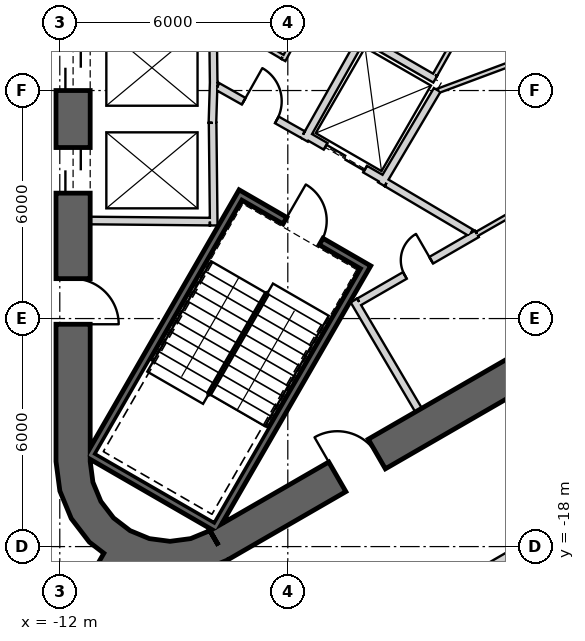
"""IFC4 building model, lengths in metres.
Left out: names, types, materials, properties, quantities, classifications, styles, units other than length and angle.
Written with IfcOpenShell. Run it as: python <this file> out.ifc"""

import sys

from ifc_helpers import new_model, si_unit, direction, frame, frame_2d, origin, place, context, subcontext, project, spatial, polyline, rectangle, outline, extrude, element, fill, save


model = new_model("IFC4")
c1 = context("Model", 3, precision=1e-05, world=origin(), true_north=direction((0.0, 1.0)))
c2 = subcontext(c1, "Body", "Model", "MODEL_VIEW")
j1 = project(units=[si_unit("LENGTHUNIT", "METRE"), si_unit("PLANEANGLEUNIT", "RADIAN")], contexts=[c1])
p1 = place(None, origin())
s1 = spatial("IfcSite", under=j1, at=p1, CompositionType="ELEMENT")
p2 = place(p1, origin())
s2 = spatial("IfcBuilding", under=s1, at=p2, CompositionType="ELEMENT")
p3 = place(p2, frame((0.0, 0.0, 298.7)))
s3 = spatial("IfcBuildingStorey", under=s2, at=p3, CompositionType="ELEMENT", Elevation=298.7)
p4 = place(p3, frame((-11.65, 15.762, 0.0), z_axis=(0.0, 0.0, 1.0), x_axis=(0.0, -1.0, 0.0)))
e1 = element("IfcWall", 1, at=p4, inside=s3, PredefinedType="SHEAR", context=c2, shape_type="SweptSolid", body=[
    extrude(rectangle(XDim=31.523, YDim=0.9, at=frame_2d((15.762, 0.0))), origin(), (0.0, 0.0, 1.0), 3.9),
])
p5 = place(p4, frame((7.062, 0.0, 0.0)))
e2 = element("IfcOpeningElement", 2, at=p5, cuts=e1, PredefinedType="OPENING", context=c2, shape_type="SweptSolid", body=[
    extrude(rectangle(XDim=1.2, YDim=2.4, at=frame_2d((0.6, 1.2))), frame((0.0, 0.46, 0.0), z_axis=(0.0, -1.0, 0.0), x_axis=(1.0, 0.0, 0.0)), (0.0, 0.0, 1.0), 0.92),
])
p6 = place(p4, frame((9.762, 0.0, 0.0)))
e3 = element("IfcOpeningElement", 3, at=p6, cuts=e1, PredefinedType="OPENING", context=c2, shape_type="SweptSolid", body=[
    extrude(rectangle(XDim=1.2, YDim=2.4, at=frame_2d((0.6, 1.2))), frame((0.0, 0.46, 0.0), z_axis=(0.0, -1.0, 0.0), x_axis=(1.0, 0.0, 0.0)), (0.0, 0.0, 1.0), 0.92),
])
p7 = place(p4, frame((12.462, 0.0, 0.0)))
e4 = element("IfcOpeningElement", 4, at=p7, cuts=e1, PredefinedType="OPENING", context=c2, shape_type="SweptSolid", body=[
    extrude(rectangle(XDim=1.2, YDim=2.4, at=frame_2d((0.6, 1.2))), frame((0.0, 0.46, 0.0), z_axis=(0.0, -1.0, 0.0), x_axis=(1.0, 0.0, 0.0)), (0.0, 0.0, 1.0), 0.92),
])
p8 = place(p4, frame((15.162, 0.0, 0.0)))
e5 = element("IfcOpeningElement", 5, at=p8, cuts=e1, PredefinedType="OPENING", context=c2, shape_type="SweptSolid", body=[
    extrude(rectangle(XDim=1.2, YDim=2.4, at=frame_2d((0.6, 1.2))), frame((0.0, 0.46, 0.0), z_axis=(0.0, -1.0, 0.0), x_axis=(1.0, 0.0, 0.0)), (0.0, 0.0, 1.0), 0.92),
])
p9 = place(p4, frame((17.862, 0.0, 0.0)))
e6 = element("IfcOpeningElement", 6, at=p9, cuts=e1, PredefinedType="OPENING", context=c2, shape_type="SweptSolid", body=[
    extrude(rectangle(XDim=1.2, YDim=2.4, at=frame_2d((0.6, 1.2))), frame((0.0, 0.46, 0.0), z_axis=(0.0, -1.0, 0.0), x_axis=(1.0, 0.0, 0.0)), (0.0, 0.0, 1.0), 0.92),
])
p10 = place(p4, frame((20.562, 0.0, 0.0)))
e7 = element("IfcOpeningElement", 7, at=p10, cuts=e1, PredefinedType="OPENING", context=c2, shape_type="SweptSolid", body=[
    extrude(rectangle(XDim=1.2, YDim=2.4, at=frame_2d((0.6, 1.2))), frame((0.0, 0.46, 0.0), z_axis=(0.0, -1.0, 0.0), x_axis=(1.0, 0.0, 0.0)), (0.0, 0.0, 1.0), 0.92),
])
p11 = place(p4, frame((23.262, 0.0, 0.0)))
e8 = element("IfcOpeningElement", 8, at=p11, cuts=e1, PredefinedType="OPENING", context=c2, shape_type="SweptSolid", body=[
    extrude(rectangle(XDim=1.2, YDim=2.4, at=frame_2d((0.6, 1.2))), frame((0.0, 0.46, 0.0), z_axis=(0.0, -1.0, 0.0), x_axis=(1.0, 0.0, 0.0)), (0.0, 0.0, 1.0), 0.92),
])
p12 = place(p4, frame((3.612, 0.0, 0.0)))
e9 = element("IfcOpeningElement", 9, at=p12, cuts=e1, PredefinedType="OPENING", context=c2, shape_type="SweptSolid", body=[
    extrude(rectangle(XDim=1.2, YDim=2.4, at=frame_2d((0.6, 1.2))), frame((0.0, 0.46, 0.0), z_axis=(0.0, -1.0, 0.0), x_axis=(1.0, 0.0, 0.0)), (0.0, 0.0, 1.0), 0.92),
])
p13 = place(p4, frame((26.712, 0.0, 0.0)))
e10 = element("IfcOpeningElement", 10, at=p13, cuts=e1, PredefinedType="OPENING", context=c2, shape_type="SweptSolid", body=[
    extrude(rectangle(XDim=1.2, YDim=2.4, at=frame_2d((0.6, 1.2))), frame((0.0, 0.46, 0.0), z_axis=(0.0, -1.0, 0.0), x_axis=(1.0, 0.0, 0.0)), (0.0, 0.0, 1.0), 0.92),
])
p14 = place(p3, frame((-7.825, -17.97, 0.0), z_axis=(0.0, 0.0, 1.0), x_axis=(0.866028369851, 0.499994862586, 0.0)))
e11 = element("IfcWall", 11, at=p14, inside=s3, PredefinedType="SHEAR", context=c2, shape_type="SweptSolid", body=[
    extrude(rectangle(XDim=31.523, YDim=0.9, at=frame_2d((15.762, 0.0))), origin(), (0.0, 0.0, 1.0), 3.9),
])
p15 = place(p14, frame((17.862, 0.0, 0.0)))
e12 = element("IfcOpeningElement", 12, at=p15, cuts=e11, PredefinedType="OPENING", context=c2, shape_type="SweptSolid", body=[
    extrude(rectangle(XDim=1.2, YDim=2.4, at=frame_2d((0.6, 1.2))), frame((0.0, 0.46, 0.0), z_axis=(0.0, -1.0, 0.0), x_axis=(1.0, 0.0, 0.0)), (0.0, 0.0, 1.0), 0.92),
])
p16 = place(p14, frame((20.562, 0.0, 0.0)))
e13 = element("IfcOpeningElement", 13, at=p16, cuts=e11, PredefinedType="OPENING", context=c2, shape_type="SweptSolid", body=[
    extrude(rectangle(XDim=1.2, YDim=2.4, at=frame_2d((0.6, 1.2))), frame((0.0, 0.46, 0.0), z_axis=(0.0, -1.0, 0.0), x_axis=(1.0, 0.0, 0.0)), (0.0, 0.0, 1.0), 0.92),
])
p17 = place(p14, frame((26.712, 0.0, 0.0)))
e14 = element("IfcOpeningElement", 14, at=p17, cuts=e11, PredefinedType="OPENING", context=c2, shape_type="SweptSolid", body=[
    extrude(rectangle(XDim=1.2, YDim=2.4, at=frame_2d((0.6, 1.2))), frame((0.0, 0.46, 0.0), z_axis=(0.0, -1.0, 0.0), x_axis=(1.0, 0.0, 0.0)), (0.0, 0.0, 1.0), 0.92),
])
p18 = place(p14, frame((3.612, 0.0, 0.0)))
e15 = element("IfcOpeningElement", 15, at=p18, cuts=e11, PredefinedType="OPENING", context=c2, shape_type="SweptSolid", body=[
    extrude(rectangle(XDim=1.2, YDim=2.4, at=frame_2d((0.6, 1.2))), frame((0.0, 0.46, 0.0), z_axis=(0.0, -1.0, 0.0), x_axis=(1.0, 0.0, 0.0)), (0.0, 0.0, 1.0), 0.92),
])
p19 = place(p3, origin())
e16 = element("IfcWall", 16, at=p19, inside=s3, PredefinedType="SHEAR", context=c2, shape_type="SweptSolid", body=[
    extrude(outline(polyline([(-12.1, -15.762), (-11.998, -16.538), (-11.698, -17.262), (-11.221, -17.883), (-10.6, -18.36), (-9.876, -18.659), (-9.1, -18.762), (-8.323, -18.659), (-7.6, -18.36), (-8.05, -17.58), (-8.556, -17.79), (-9.1, -17.862), (-9.644, -17.79), (-10.15, -17.58), (-10.585, -17.247), (-10.919, -16.812), (-11.128, -16.305), (-11.2, -15.762), (-12.1, -15.762)])), origin(), (0.0, 0.0, 1.0), 3.9),
])
p20 = place(p3, frame((-10.575, -18.316, 0.0), z_axis=(0.0, 0.0, 1.0), x_axis=(-0.499999297704, -0.866025809255, 0.0)))
e17 = element("IfcWall", 17, at=p20, inside=s3, PredefinedType="SHEAR", context=c2, shape_type="SweptSolid", body=[
    extrude(rectangle(XDim=9.72, YDim=0.6, at=frame_2d((4.86, 0.0))), origin(), (0.0, 0.0, 1.0), 3.9),
])
p21 = place(p20, frame((1.4, 0.0, 0.0)))
e18 = element("IfcOpeningElement", 18, at=p21, cuts=e17, PredefinedType="OPENING", context=c2, shape_type="SweptSolid", body=[
    extrude(rectangle(XDim=1.4, YDim=2.4, at=frame_2d((0.7, 1.2))), frame((0.0, 0.31, 0.0), z_axis=(0.0, -1.0, 0.0), x_axis=(1.0, 0.0, 0.0)), (0.0, 0.0, 1.0), 0.62),
])
p22 = place(p3, frame((-7.95, -5.772, 0.0), z_axis=(0.0, 0.0, 1.0), x_axis=(-0.030803413295, -0.999525462272, 0.0)))
e19 = element("IfcWall", 19, at=p22, inside=s3, PredefinedType="PLUMBINGWALL", context=c2, shape_type="SweptSolid", body=[
    extrude(rectangle(XDim=1.078, YDim=0.2, at=frame_2d((0.539, 0.0))), origin(), (0.0, 0.0, 1.0), 3.6),
])
p23 = place(p3, frame((-7.971, -4.05, 0.0), z_axis=(0.0, 0.0, 1.0), x_axis=(0.012042535896, -0.999927486035, 0.0)))
e20 = element("IfcWall", 20, at=p23, inside=s3, PredefinedType="PLUMBINGWALL", context=c2, shape_type="SweptSolid", body=[
    extrude(rectangle(XDim=1.845, YDim=0.2, at=frame_2d((0.922, 0.0))), origin(), (0.0, 0.0, 1.0), 3.6),
])
p24 = place(p3, frame((-7.979, -6.85, 0.0), z_axis=(0.0, 0.0, 1.0), x_axis=(0.011121475088, -0.999938154483, 0.0)))
e21 = element("IfcWall", 21, at=p24, inside=s3, PredefinedType="PLUMBINGWALL", context=c2, shape_type="SweptSolid", body=[
    extrude(rectangle(XDim=2.7, YDim=0.2, at=frame_2d((1.35, 0.0))), origin(), (0.0, 0.0, 1.0), 3.6),
])
p25 = place(p3, frame((-8.05, -9.449, 0.0), z_axis=(0.0, 0.0, 1.0), x_axis=(-0.999957467379, 0.009222983926, 0.0)))
e22 = element("IfcWall", 22, at=p25, inside=s3, PredefinedType="PLUMBINGWALL", context=c2, shape_type="SweptSolid", body=[
    extrude(rectangle(XDim=3.15, YDim=0.2, at=frame_2d((1.575, 0.0))), origin(), (0.0, 0.0, 1.0), 3.6),
])
p26 = place(p3, frame((-3.905, -10.563, -0.3), z_axis=(0.0, 0.0, 1.0), x_axis=(-0.500012932018, -0.866017937352, 0.0)))
e23 = element("IfcWall", 23, at=p26, inside=s3, PredefinedType="SHEAR", context=c2, shape_type="SweptSolid", body=[
    extrude(rectangle(XDim=8.1, YDim=0.2, at=frame_2d((4.05, 0.0))), origin(), (0.0, 0.0, 1.0), 3.9),
])
p27 = place(p3, frame((-11.282, -15.541, -0.3), z_axis=(0.0, 0.0, 1.0), x_axis=(0.866000483506, -0.500043160704, 0.0)))
e24 = element("IfcWall", 24, at=p27, inside=s3, PredefinedType="SHEAR", context=c2, shape_type="SweptSolid", body=[
    extrude(rectangle(XDim=3.8, YDim=0.2, at=frame_2d((1.9, 0.0))), origin(), (0.0, 0.0, 1.0), 3.9),
])
p28 = place(p3, frame((-7.196, -8.663, -0.3), z_axis=(0.0, 0.0, 1.0), x_axis=(-0.499997992926, -0.866026562566, 0.0)))
e25 = element("IfcWall", 25, at=p28, inside=s3, PredefinedType="SHEAR", context=c2, shape_type="SweptSolid", body=[
    extrude(rectangle(XDim=7.9, YDim=0.2, at=frame_2d((3.95, 0.0))), origin(), (0.0, 0.0, 1.0), 3.9),
])
p29 = place(p3, frame((-4.041, -10.599, -0.3), z_axis=(0.0, 0.0, 1.0), x_axis=(-0.866047807691, 0.499961193289, 0.0)))
e26 = element("IfcWall", 26, at=p29, inside=s3, PredefinedType="SHEAR", context=c2, shape_type="SweptSolid", body=[
    extrude(rectangle(XDim=3.6, YDim=0.2, at=frame_2d((1.8, 0.0))), origin(), (0.0, 0.0, 1.0), 3.9),
])
p30 = place(p29, frame((1.25, 0.0, 0.3)))
e27 = element("IfcOpeningElement", 27, at=p30, cuts=e26, PredefinedType="OPENING", context=c2, shape_type="SweptSolid", body=[
    extrude(rectangle(XDim=1.1, YDim=2.1, at=frame_2d((0.55, 1.05))), frame((0.0, 0.11, 0.0), z_axis=(0.0, -1.0, 0.0), x_axis=(1.0, 0.0, 0.0)), (0.0, 0.0, 1.0), 0.22),
])
p31 = place(p3, frame((-3.446, -8.368, 0.0), z_axis=(0.0, 0.0, 1.0), x_axis=(-0.866024647952, 0.500001309137, 0.0)))
e28 = element("IfcWall", 28, at=p31, inside=s3, PredefinedType="PLUMBINGWALL", context=c2, shape_type="SweptSolid", body=[
    extrude(rectangle(XDim=2.4, YDim=0.2, at=frame_2d((1.2, 0.0))), origin(), (0.0, 0.0, 1.0), 3.6),
])
p32 = place(p31, frame((0.6, 0.0, 0.0)))
e29 = element("IfcOpeningElement", 29, at=p32, cuts=e28, PredefinedType="OPENING", context=c2, shape_type="SweptSolid", body=[
    extrude(rectangle(XDim=1.2, YDim=2.4, at=frame_2d((0.6, 1.2))), frame((0.0, 0.11, 0.0), z_axis=(0.0, -1.0, 0.0), x_axis=(1.0, 0.0, 0.0)), (0.0, 0.0, 1.0), 0.22),
])
p33 = place(p3, frame((-2.07, -5.986, 0.0), z_axis=(0.0, 0.0, 1.0), x_axis=(-0.509302965445, -0.8605872933, 0.0)))
e30 = element("IfcWall", 30, at=p33, inside=s3, PredefinedType="PLUMBINGWALL", context=c2, shape_type="SweptSolid", body=[
    extrude(rectangle(XDim=2.881, YDim=0.2, at=frame_2d((1.441, 0.0))), origin(), (0.0, 0.0, 1.0), 3.6),
])
p34 = place(p3, frame((-3.99, -4.509, 0.0), z_axis=(0.0, 0.0, 1.0), x_axis=(-0.491358283181, -0.870957540612, 0.0)))
e31 = element("IfcWall", 31, at=p34, inside=s3, PredefinedType="PLUMBINGWALL", context=c2, shape_type="SweptSolid", body=[
    extrude(rectangle(XDim=3.2, YDim=0.2, at=frame_2d((1.6, 0.0))), origin(), (0.0, 0.0, 1.0), 3.6),
])
p35 = place(p3, frame((-3.953, -4.646, 0.0), z_axis=(0.0, 0.0, 1.0), x_axis=(0.866060616833, -0.499939004251, 0.0)))
e32 = element("IfcWall", 32, at=p35, inside=s3, PredefinedType="PLUMBINGWALL", context=c2, shape_type="SweptSolid", body=[
    extrude(rectangle(XDim=2.115, YDim=0.2, at=frame_2d((1.057, 0.0))), origin(), (0.0, 0.0, 1.0), 3.6),
])
p36 = place(p3, frame((-4.26, -11.524, 0.0), z_axis=(0.0, 0.0, 1.0), x_axis=(0.507997497166, -0.861358544901, 0.0)))
e33 = element("IfcWall", 33, at=p36, inside=s3, PredefinedType="PARTITIONING", context=c2, shape_type="SweptSolid", body=[
    extrude(rectangle(XDim=3.35, YDim=0.2, at=frame_2d((1.675, 0.0))), origin(), (0.0, 0.0, 1.0), 3.6),
])
p37 = place(p3, frame((-1.024, -9.771, 0.0), z_axis=(0.0, 0.0, 1.0), x_axis=(-0.866029903013, -0.499992207027, 0.0)))
e34 = element("IfcWall", 34, at=p37, inside=s3, PredefinedType="PARTITIONING", context=c2, shape_type="SweptSolid", body=[
    extrude(rectangle(XDim=3.578, YDim=0.2, at=frame_2d((1.789, 0.0))), origin(), (0.0, 0.0, 1.0), 3.6),
])
p38 = place(p37, frame((1.389, 0.0, 0.0)))
e35 = element("IfcOpeningElement", 35, at=p38, cuts=e34, PredefinedType="OPENING", context=c2, shape_type="SweptSolid", body=[
    extrude(rectangle(XDim=0.8, YDim=2.1, at=frame_2d((0.4, 1.05))), frame((0.0, 0.11, 0.0), z_axis=(0.0, -1.0, 0.0), x_axis=(1.0, 0.0, 0.0)), (0.0, 0.0, 1.0), 0.22),
])
p39 = place(p3, frame((-1.024, -9.771, 0.0), z_axis=(0.0, 0.0, 1.0), x_axis=(0.868110220015, 0.496371479746, 0.0)))
e36 = element("IfcWall", 36, at=p39, inside=s3, PredefinedType="PARTITIONING", context=c2, shape_type="SweptSolid", body=[
    extrude(rectangle(XDim=7.123, YDim=0.12, at=frame_2d((3.561, 0.0))), origin(), (0.0, 0.0, 1.0), 3.6),
])
p40 = place(p39, frame((5.373, 0.0, 0.0)))
e37 = element("IfcOpeningElement", 37, at=p40, cuts=e36, PredefinedType="OPENING", context=c2, shape_type="SweptSolid", body=[
    extrude(rectangle(XDim=0.8, YDim=2.1, at=frame_2d((0.4, 1.05))), frame((0.0, 0.07, 0.0), z_axis=(0.0, -1.0, 0.0), x_axis=(1.0, 0.0, 0.0)), (0.0, 0.0, 1.0), 0.14),
])
p41 = place(p3, frame((-3.401, -8.43, 0.0), z_axis=(0.0, 0.0, 1.0), x_axis=(0.860630814782, -0.509229418482, 0.0)))
e38 = element("IfcWall", 38, at=p41, inside=s3, PredefinedType="PARTITIONING", context=c2, shape_type="SweptSolid", body=[
    extrude(rectangle(XDim=2.582, YDim=0.2, at=frame_2d((1.291, 0.0))), origin(), (0.0, 0.0, 1.0), 3.6),
])
p42 = place(p3, frame((-7.849, -5.894, 0.0), z_axis=(0.0, 0.0, 1.0), x_axis=(0.871363259478, -0.490638431059, 0.0)))
e39 = element("IfcWall", 39, at=p42, inside=s3, PredefinedType="PARTITIONING", context=c2, shape_type="SweptSolid", body=[
    extrude(rectangle(XDim=2.581, YDim=0.2, at=frame_2d((1.291, 0.0))), origin(), (0.0, 0.0, 1.0), 3.6),
])
p43 = place(p42, frame((0.791, 0.0, 0.0)))
e40 = element("IfcOpeningElement", 40, at=p43, cuts=e39, PredefinedType="OPENING", context=c2, shape_type="SweptSolid", body=[
    extrude(rectangle(XDim=1.0, YDim=2.1, at=frame_2d((0.5, 1.05))), frame((0.0, 0.11, 0.0), z_axis=(0.0, -1.0, 0.0), x_axis=(1.0, 0.0, 0.0)), (0.0, 0.0, 1.0), 0.22),
])
p44 = place(p3, frame((6.905, -2.679, 0.0), z_axis=(0.0, 0.0, 1.0), x_axis=(-0.937260745886, -0.348629164331, 0.0)))
e41 = element("IfcWall", 41, at=p44, inside=s3, PredefinedType="PARTITIONING", context=c2, shape_type="SweptSolid", body=[
    extrude(rectangle(XDim=9.541, YDim=0.12, at=frame_2d((4.771, 0.0))), origin(), (0.0, 0.0, 1.0), 3.6),
])
p45 = place(p3, frame((-0.466, -2.655, 0.0), z_axis=(0.0, 0.0, 1.0), x_axis=(-0.49235580986, -0.870394023703, 0.0)))
e42 = element("IfcWall", 42, at=p45, inside=s3, PredefinedType="PARTITIONING", context=c2, shape_type="SweptSolid", body=[
    extrude(rectangle(XDim=3.368, YDim=0.12, at=frame_2d((1.684, 0.0))), origin(), (0.0, 0.0, 1.0), 3.6),
])
p46 = place(p45, frame((1.335, 0.0, 0.0)))
e43 = element("IfcOpeningElement", 43, at=p46, cuts=e42, PredefinedType="OPENING", context=c2, shape_type="SweptSolid", body=[
    extrude(rectangle(XDim=0.8, YDim=2.1, at=frame_2d((0.4, 1.05))), frame((0.0, 0.07, 0.0), z_axis=(0.0, -1.0, 0.0), x_axis=(1.0, 0.0, 0.0)), (0.0, 0.0, 1.0), 0.14),
])
p47 = place(p3, frame((-6.117, -5.198, 0.0), z_axis=(0.0, 0.0, 1.0), x_axis=(0.473067931341, 0.881025954406, 0.0)))
e44 = element("IfcWall", 44, at=p47, inside=s3, PredefinedType="PARTITIONING", context=c2, shape_type="SweptSolid", body=[
    extrude(rectangle(XDim=1.016, YDim=0.12, at=frame_2d((0.508, 0.0))), origin(), (0.0, 0.0, 1.0), 3.6),
])
p48 = place(p3, frame((-7.95, -4.041, 0.0), z_axis=(0.0, 0.0, 1.0), x_axis=(0.860112457103, -0.510104461004, 0.0)))
e45 = element("IfcWall", 45, at=p48, inside=s3, PredefinedType="PARTITIONING", context=c2, shape_type="SweptSolid", body=[
    extrude(rectangle(XDim=2.104, YDim=0.12, at=frame_2d((1.052, 0.0))), origin(), (0.0, 0.0, 1.0), 3.6),
])
p49 = place(p3, frame((-6.505, -21.885, 0.0), z_axis=(0.0, 0.0, 1.0), x_axis=(0.866029997737, 0.499992042957, 0.0)))
e46 = element("IfcWall", 46, at=p49, inside=s3, PredefinedType="PARTITIONING", context=c2, shape_type="SweptSolid", body=[
    extrude(rectangle(XDim=9.146, YDim=0.2, at=frame_2d((4.573, 0.0))), origin(), (0.0, 0.0, 1.0), 2.88),
])
p50 = place(p49, frame((4.111, 0.0, 0.0)))
e47 = element("IfcOpeningElement", 47, at=p50, cuts=e46, PredefinedType="OPENING", context=c2, shape_type="SweptSolid", body=[
    extrude(rectangle(XDim=1.0, YDim=2.1, at=frame_2d((0.5, 1.05))), frame((0.0, 0.11, 0.0), z_axis=(0.0, -1.0, 0.0), x_axis=(1.0, 0.0, 0.0)), (0.0, 0.0, 1.0), 0.22),
])
p51 = place(p30, origin())
e48 = element("IfcDoor", 48, at=p51, inside=s3, OperationType="SINGLE_SWING_RIGHT", PredefinedType="USERDEFINED", context=c2, shape_type="SweptSolid", body=[
    extrude(rectangle(XDim=1.1, YDim=2.1, at=frame_2d((0.55, 1.05))), frame((0.0, 0.025, 0.0), z_axis=(0.0, -1.0, 0.0), x_axis=(1.0, 0.0, 0.0)), (0.0, 0.0, 1.0), 0.05),
])
fill(e27, e48)
p52 = place(p43, origin())
e49 = element("IfcDoor", 49, at=p52, inside=s3, OperationType="SINGLE_SWING_RIGHT", PredefinedType="USERDEFINED", context=c2, shape_type="SweptSolid", body=[
    extrude(rectangle(XDim=1.0, YDim=2.1, at=frame_2d((0.5, 1.05))), frame((0.0, 0.025, 0.0), z_axis=(0.0, -1.0, 0.0), x_axis=(1.0, 0.0, 0.0)), (0.0, 0.0, 1.0), 0.05),
])
fill(e40, e49)
p53 = place(p32, origin())
e50 = element("IfcDoor", 50, at=p53, inside=s3, OperationType="SLIDING_TO_LEFT", PredefinedType="USERDEFINED", context=c2, shape_type="SweptSolid", body=[
    extrude(rectangle(XDim=1.2, YDim=2.4, at=frame_2d((0.6, 1.2))), frame((0.0, 0.025, 0.0), z_axis=(0.0, -1.0, 0.0), x_axis=(1.0, 0.0, 0.0)), (0.0, 0.0, 1.0), 0.05),
])
fill(e29, e50)
p54 = place(p38, origin())
e51 = element("IfcDoor", 51, at=p54, inside=s3, OperationType="SINGLE_SWING_LEFT", PredefinedType="USERDEFINED", context=c2, shape_type="SweptSolid", body=[
    extrude(rectangle(XDim=0.8, YDim=2.1, at=frame_2d((0.4, 1.05))), frame((0.0, 0.025, 0.0), z_axis=(0.0, -1.0, 0.0), x_axis=(1.0, 0.0, 0.0)), (0.0, 0.0, 1.0), 0.05),
])
fill(e35, e51)
p55 = place(p10, origin())
e52 = element("IfcDoor", 52, at=p55, inside=s3, OperationType="SLIDING_TO_LEFT", PredefinedType="USERDEFINED", context=c2, shape_type="SweptSolid", body=[
    extrude(rectangle(XDim=1.2, YDim=2.4, at=frame_2d((0.6, 1.2))), frame((0.0, 0.025, 0.0), z_axis=(0.0, -1.0, 0.0), x_axis=(1.0, 0.0, 0.0)), (0.0, 0.0, 1.0), 0.05),
])
fill(e7, e52)
p56 = place(p11, origin())
e53 = element("IfcDoor", 53, at=p56, inside=s3, OperationType="SLIDING_TO_LEFT", PredefinedType="USERDEFINED", context=c2, shape_type="SweptSolid", body=[
    extrude(rectangle(XDim=1.2, YDim=2.4, at=frame_2d((0.6, 1.2))), frame((0.0, 0.025, 0.0), z_axis=(0.0, -1.0, 0.0), x_axis=(1.0, 0.0, 0.0)), (0.0, 0.0, 1.0), 0.05),
])
fill(e8, e53)
p57 = place(p13, origin())
e54 = element("IfcDoor", 54, at=p57, inside=s3, OperationType="SINGLE_SWING_LEFT", PredefinedType="USERDEFINED", context=c2, shape_type="SweptSolid", body=[
    extrude(rectangle(XDim=1.2, YDim=2.4, at=frame_2d((0.6, 1.2))), frame((0.0, 0.025, 0.0), z_axis=(0.0, -1.0, 0.0), x_axis=(1.0, 0.0, 0.0)), (0.0, 0.0, 1.0), 0.05),
])
fill(e10, e54)
p58 = place(p18, origin())
e55 = element("IfcDoor", 55, at=p58, inside=s3, OperationType="SINGLE_SWING_RIGHT", PredefinedType="USERDEFINED", context=c2, shape_type="SweptSolid", body=[
    extrude(rectangle(XDim=1.2, YDim=2.4, at=frame_2d((0.6, 1.2))), frame((0.0, 0.025, 0.0), z_axis=(0.0, -1.0, 0.0), x_axis=(1.0, 0.0, 0.0)), (0.0, 0.0, 1.0), 0.05),
])
fill(e15, e55)
save(model, sys.argv[1])
